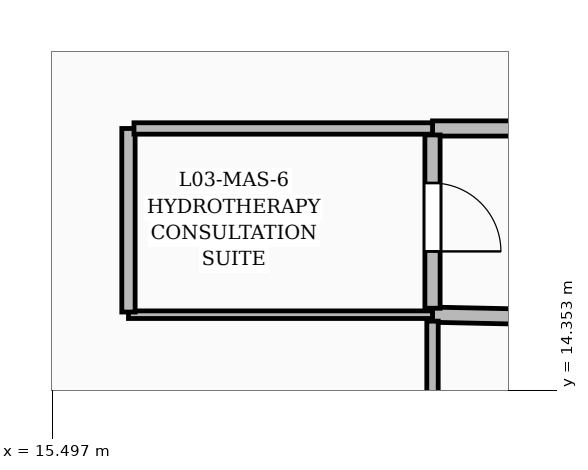
"""IFC4 building model, lengths in metres.
Left out: names, types, materials, properties, quantities, classifications, styles, units other than length and angle.
Written with IfcOpenShell. Run it as: python <this file> out.ifc"""

import sys

from ifc_helpers import new_model, si_unit, direction, frame, frame_2d, origin, place, context, subcontext, project, spatial, rectangle, extrude, element, fill, save


model = new_model("IFC4")
c1 = context("Model", 3, precision=1e-05, world=origin(), true_north=direction((0.0, 1.0)))
c2 = subcontext(c1, "Body", "Model", "MODEL_VIEW")
j1 = project(units=[si_unit("LENGTHUNIT", "METRE"), si_unit("PLANEANGLEUNIT", "RADIAN")], contexts=[c1])
p1 = place(None, origin())
s1 = spatial("IfcSite", under=j1, at=p1, CompositionType="ELEMENT")
p2 = place(p1, origin())
s2 = spatial("IfcBuilding", under=s1, at=p2, CompositionType="ELEMENT")
p3 = place(p2, frame((0.0, 0.0, 17.4)))
s3 = spatial("IfcBuildingStorey", under=s2, at=p3, CompositionType="ELEMENT", Elevation=17.4)
p4 = place(p3, frame((12.107, 17.14, 0.0), z_axis=(0.0, 0.0, 1.0), x_axis=(0.550188457537, 0.835040514701, 0.0)))
e1 = element("IfcWall", 1, at=p4, inside=s3, PredefinedType="SOLIDWALL", context=c2, shape_type="SweptSolid", body=[
    extrude(rectangle(XDim=6.38, YDim=0.3, at=frame_2d((3.19, 0.0))), origin(), (0.0, 0.0, 1.0), 4.2),
])
p5 = place(p4, frame((2.475, 0.0, 0.55)))
e2 = element("IfcOpeningElement", 2, at=p5, cuts=e1, PredefinedType="OPENING", context=c2, shape_type="SweptSolid", body=[
    extrude(rectangle(XDim=1.6, YDim=2.2, at=frame_2d((0.8, 1.1))), frame((0.0, 0.16, 0.0), z_axis=(0.0, -1.0, 0.0), x_axis=(1.0, 0.0, 0.0)), (0.0, 0.0, 1.0), 0.32),
])
p6 = place(p3, frame((20.5, 15.35, 0.0), z_axis=(0.0, 0.0, 1.0), x_axis=(0.999776475021, -0.021142374394, 0.0)))
e3 = element("IfcWall", 3, at=p6, inside=s3, PredefinedType="PARTITIONING", context=c2, shape_type="SweptSolid", body=[
    extrude(rectangle(XDim=7.102, YDim=0.2, at=frame_2d((3.551, 0.0))), origin(), (0.0, 0.0, 1.0), 3.078),
])
p7 = place(p6, frame((3.101, 0.0, 0.0)))
e4 = element("IfcOpeningElement", 4, at=p7, cuts=e3, PredefinedType="OPENING", context=c2, shape_type="SweptSolid", body=[
    extrude(rectangle(XDim=0.9, YDim=2.1, at=frame_2d((0.45, 1.05))), frame((0.0, 0.11, 0.0), z_axis=(0.0, -1.0, 0.0), x_axis=(1.0, 0.0, 0.0)), (0.0, 0.0, 1.0), 0.22),
])
p8 = place(p3, frame((23.5, 17.8, 0.0), z_axis=(0.0, 0.0, 1.0), x_axis=(-1.0, 0.0, 0.0)))
e5 = element("IfcWall", 5, at=p8, inside=s3, PredefinedType="PARTITIONING", context=c2, shape_type="SweptSolid", body=[
    extrude(rectangle(XDim=3.0, YDim=0.2, at=frame_2d((1.5, 0.0))), origin(), (0.0, 0.0, 1.0), 3.078),
])
p9 = place(p8, frame((1.05, 0.0, 0.0)))
e6 = element("IfcOpeningElement", 6, at=p9, cuts=e5, PredefinedType="OPENING", context=c2, shape_type="SweptSolid", body=[
    extrude(rectangle(XDim=0.9, YDim=2.1, at=frame_2d((0.45, 1.05))), frame((0.0, 0.11, 0.0), z_axis=(0.0, -1.0, 0.0), x_axis=(1.0, 0.0, 0.0)), (0.0, 0.0, 1.0), 0.22),
])
p10 = place(p3, frame((20.5, 17.715, 0.0), z_axis=(0.0, 0.0, 1.0), x_axis=(0.0, -1.0, 0.0)))
e7 = element("IfcWall", 7, at=p10, inside=s3, PredefinedType="PARTITIONING", context=c2, shape_type="SweptSolid", body=[
    extrude(rectangle(XDim=2.28, YDim=0.2, at=frame_2d((1.14, 0.0))), origin(), (0.0, 0.0, 1.0), 3.71),
])
p11 = place(p10, frame((0.632, 0.0, 0.0)))
e8 = element("IfcOpeningElement", 8, at=p11, cuts=e7, PredefinedType="OPENING", context=c2, shape_type="SweptSolid", body=[
    extrude(rectangle(XDim=0.9, YDim=2.1, at=frame_2d((0.45, 1.05))), frame((0.0, 0.11, 0.0), z_axis=(0.0, -1.0, 0.0), x_axis=(1.0, 0.0, 0.0)), (0.0, 0.0, 1.0), 0.22),
])
p12 = place(p3, frame((20.5, 15.265, 0.0), z_axis=(0.0, 0.0, 1.0), x_axis=(0.0, -1.0, 0.0)))
e9 = element("IfcWall", 9, at=p12, inside=s3, PredefinedType="PARTITIONING", context=c2, shape_type="SweptSolid", body=[
    extrude(rectangle(XDim=13.365, YDim=0.15, at=frame_2d((6.683, 0.0))), origin(), (0.0, 0.0, 1.0), 2.97),
])
p13 = place(p3, frame((20.5, 15.35, 0.0), z_axis=(0.0, 0.0, 1.0), x_axis=(-1.0, 0.0, 0.0)))
e10 = element("IfcWall", 10, at=p13, inside=s3, PredefinedType="PARTITIONING", context=c2, shape_type="SweptSolid", body=[
    extrude(rectangle(XDim=4.0, YDim=0.1, at=frame_2d((2.0, 0.0))), origin(), (0.0, 0.0, 1.0), 3.71),
])
p14 = place(p3, frame((16.5, 15.385, 0.0), z_axis=(0.0, 0.0, 1.0), x_axis=(0.0, 1.0, 0.0)))
e11 = element("IfcWall", 11, at=p14, inside=s3, PredefinedType="PARTITIONING", context=c2, shape_type="SweptSolid", body=[
    extrude(rectangle(XDim=2.415, YDim=0.175, at=frame_2d((1.208, 0.0))), origin(), (0.0, 0.0, 1.0), 4.2),
])
p15 = place(p3, frame((16.573, 17.8, 0.0), z_axis=(0.0, 0.0, 1.0), x_axis=(1.0, 0.0, 0.0)))
e12 = element("IfcWall", 12, at=p15, inside=s3, PredefinedType="PARTITIONING", context=c2, shape_type="SweptSolid", body=[
    extrude(rectangle(XDim=3.927, YDim=0.15, at=frame_2d((1.964, 0.0))), origin(), (0.0, 0.0, 1.0), 3.71),
])
p16 = place(p11, origin())
e13 = element("IfcDoor", 13, at=p16, inside=s3, OperationType="SINGLE_SWING_RIGHT", PredefinedType="DOOR", context=c2, shape_type="SweptSolid", body=[
    extrude(rectangle(XDim=0.9, YDim=2.1, at=frame_2d((0.45, 1.05))), frame((0.0, 0.025, 0.0), z_axis=(0.0, -1.0, 0.0), x_axis=(1.0, 0.0, 0.0)), (0.0, 0.0, 1.0), 0.05),
])
fill(e8, e13)
save(model, sys.argv[1])
